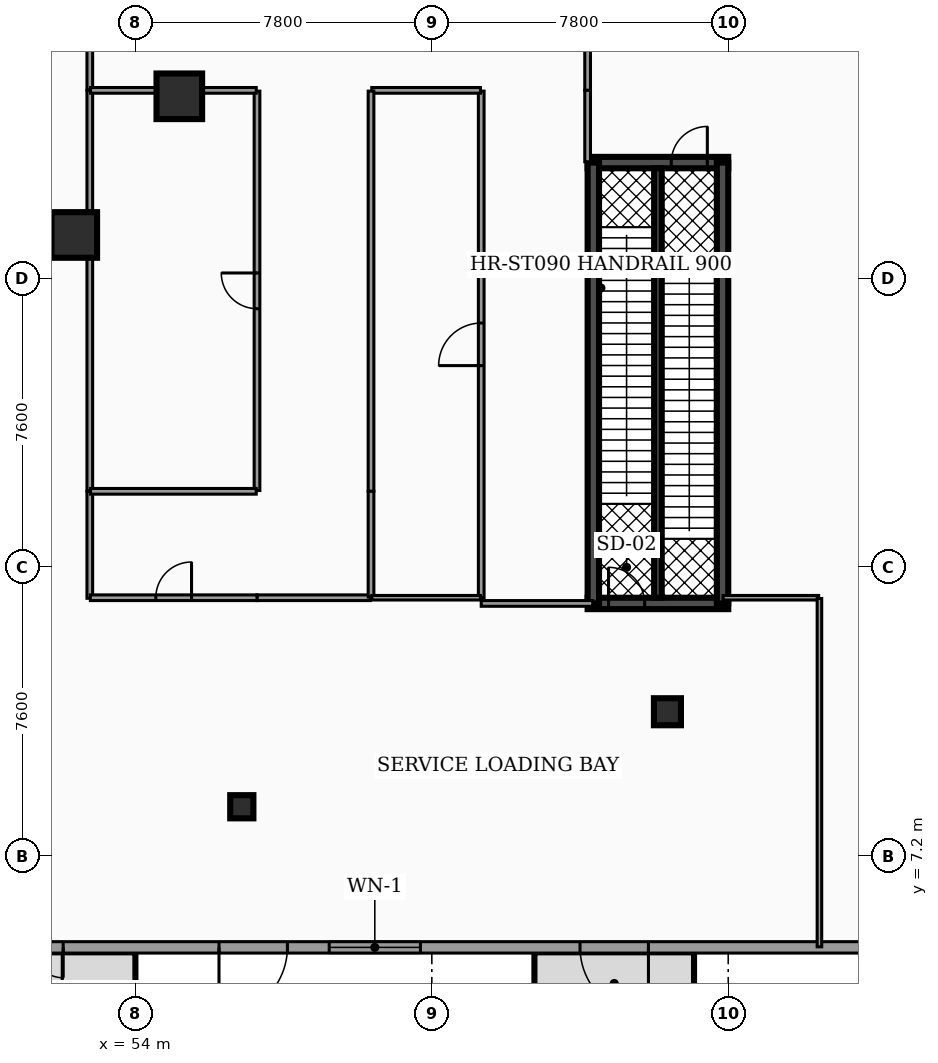
"""IFC4 building model, lengths in metres.
Left out: names, types, materials, properties, quantities, classifications, styles, units other than length and angle.
Written with IfcOpenShell. Run it as: python <this file> out.ifc"""

import sys

from ifc_helpers import new_model, si_unit, direction, frame, frame_2d, origin, origin_2d, place, context, subcontext, project, spatial, rectangle, hollow_rectangle, hollow_circle, extrude, element, fill, save


model = new_model("IFC4")
c1 = context("Model", 3, precision=1e-05, world=origin(), true_north=direction((0.0, 1.0)))
c2 = subcontext(c1, "Body", "Model", "MODEL_VIEW")
j1 = project(units=[si_unit("LENGTHUNIT", "METRE"), si_unit("PLANEANGLEUNIT", "RADIAN")], contexts=[c1])
p1 = place(None, origin())
s1 = spatial("IfcSite", under=j1, at=p1, CompositionType="ELEMENT")
p2 = place(p1, origin())
s2 = spatial("IfcBuilding", under=s1, at=p2, CompositionType="ELEMENT")
p3 = place(p2, origin())
s3 = spatial("IfcBuildingStorey", under=s2, at=p3, CompositionType="ELEMENT", Elevation=0.0)
p4 = place(p3, frame((65.9, 25.45, 0.0), z_axis=(0.0, 0.0, 1.0), x_axis=(1.0, 0.0, 0.0)))
e1 = element("IfcWall", 1, at=p4, inside=s3, PredefinedType="SHEAR", context=c2, shape_type="SweptSolid", body=[
    extrude(rectangle(XDim=3.7, YDim=0.3, at=frame_2d((1.85, 0.0))), origin(), (0.0, 0.0, 1.0), 4.82),
])
p5 = place(p4, frame((2.2, 0.0, 0.0)))
e2 = element("IfcOpeningElement", 2, at=p5, cuts=e1, PredefinedType="OPENING", context=c2, shape_type="SweptSolid", body=[
    extrude(rectangle(XDim=0.95, YDim=2.2, at=frame_2d((0.475, 1.1))), frame((0.0, 0.16, 0.0), z_axis=(0.0, -1.0, 0.0), x_axis=(1.0, 0.0, 0.0)), (0.0, 0.0, 1.0), 0.32),
])
p6 = place(p3, frame((65.9, 13.85, 0.0), z_axis=(0.0, 0.0, 1.0), x_axis=(1.0, 0.0, 0.0)))
e3 = element("IfcWall", 3, at=p6, inside=s3, PredefinedType="SHEAR", context=c2, shape_type="SweptSolid", body=[
    extrude(rectangle(XDim=3.7, YDim=0.3, at=frame_2d((1.85, 0.0))), origin(), (0.0, 0.0, 1.0), 4.82),
])
p7 = place(p6, frame((0.55, 0.0, 0.0)))
e4 = element("IfcOpeningElement", 4, at=p7, cuts=e3, PredefinedType="OPENING", context=c2, shape_type="SweptSolid", body=[
    extrude(rectangle(XDim=0.95, YDim=2.2, at=frame_2d((0.475, 1.1))), frame((0.0, 0.16, 0.0), z_axis=(0.0, -1.0, 0.0), x_axis=(1.0, 0.0, 0.0)), (0.0, 0.0, 1.0), 0.32),
])
for number, where, z_axis, x_axis in (
    (5, (66.05, 13.85, 0.0), (0.0, 0.0, 1.0), (0.0, 1.0, 0.0)),
    (6, (69.45, 13.85, 0.0), (0.0, 0.0, 1.0), (0.0, 1.0, 0.0)),
):
    element("IfcWall", number, at=place(p3, frame(where, z_axis=z_axis, x_axis=x_axis)), inside=s3, PredefinedType="SHEAR", context=c2, shape_type="SweptSolid", body=[
        extrude(rectangle(XDim=11.6, YDim=0.3, at=frame_2d((5.8, 0.0))), origin(), (0.0, 0.0, 1.0), 4.82),
    ])
p8 = place(p3, frame((67.75, 14.0, 0.0), z_axis=(0.0, 0.0, 1.0), x_axis=(0.0, 1.0, 0.0)))
e7 = element("IfcWall", 7, at=p8, inside=s3, PredefinedType="SHEAR", context=c2, shape_type="SweptSolid", body=[
    extrude(rectangle(XDim=11.3, YDim=0.2, at=frame_2d((5.65, 0.0))), origin(), (0.0, 0.0, 1.0), 4.82),
])
for number, where, z_axis, x_axis in (
    (8, (52.391, 23.545, 0.0), (0.0, 0.0, 1.0), (1.0, 0.0, 0.0)),
    (9, (55.156, 27.194, 0.0), (0.0, 0.0, 1.0), (1.0, 0.0, 0.0)),
):
    element("IfcColumn", number, at=place(p3, frame(where, z_axis=z_axis, x_axis=x_axis)), inside=s3, PredefinedType="COLUMN", context=c2, shape_type="SweptSolid", body=[
        extrude(hollow_rectangle(XDim=1.2, YDim=1.2, WallThickness=0.06, at=origin_2d()), origin(), (0.0, 0.0, 1.0), 4.82),
    ])
p9 = place(p3, frame((56.8, 8.5, 0.0), z_axis=(0.0, 0.0, 1.0), x_axis=(1.0, 0.0, 0.0)))
e10 = element("IfcColumn", 10, at=p9, inside=s3, PredefinedType="COLUMN", context=c2, shape_type="SweptSolid", body=[
    extrude(hollow_circle(Radius=0.305, WallThickness=0.025, at=origin_2d()), origin(), (0.0, 0.0, 1.0), 4.82),
])
p10 = place(p3, frame((68.0, 11.0, 0.0), z_axis=(0.0, 0.0, 1.0), x_axis=(1.0, 0.0, 0.0)))
e11 = element("IfcColumn", 11, at=p10, inside=s3, PredefinedType="COLUMN", context=c2, shape_type="SweptSolid", body=[
    extrude(hollow_circle(Radius=0.355, WallThickness=0.03, at=origin_2d()), origin(), (0.0, 0.0, 1.0), 4.82),
])
p11 = place(p3, frame((75.1, 4.8, 0.0), z_axis=(0.0, 0.0, 1.0), x_axis=(-1.0, 0.0, 0.0)))
e12 = element("IfcWall", 12, at=p11, inside=s3, PredefinedType="STANDARD", context=c2, shape_type="SweptSolid", body=[
    extrude(rectangle(XDim=73.4, YDim=0.3, at=frame_2d((36.7, 0.0))), origin(), (0.0, 0.0, 1.0), 4.205),
])
p12 = place(p11, frame((65.3, 0.0, 0.0)))
e13 = element("IfcOpeningElement", 13, at=p12, cuts=e12, PredefinedType="OPENING", context=c2, shape_type="SweptSolid", body=[
    extrude(rectangle(XDim=4.4, YDim=3.5, at=frame_2d((2.2, 1.75))), frame((0.0, 0.16, 0.0), z_axis=(0.0, -1.0, 0.0), x_axis=(1.0, 0.0, 0.0)), (0.0, 0.0, 1.0), 0.32),
])
p13 = place(p11, frame((31.15, 0.0, 0.0)))
e14 = element("IfcOpeningElement", 14, at=p13, cuts=e12, PredefinedType="OPENING", context=c2, shape_type="SweptSolid", body=[
    extrude(rectangle(XDim=2.4, YDim=2.6, at=frame_2d((1.2, 1.3))), frame((0.0, 0.16, 0.0), z_axis=(0.0, -1.0, 0.0), x_axis=(1.0, 0.0, 0.0)), (0.0, 0.0, 1.0), 0.32),
])
p14 = place(p11, frame((50.6, 0.0, 0.0)))
e15 = element("IfcOpeningElement", 15, at=p14, cuts=e12, PredefinedType="OPENING", context=c2, shape_type="SweptSolid", body=[
    extrude(rectangle(XDim=1.6, YDim=2.4, at=frame_2d((0.8, 1.2))), frame((0.0, 0.16, 0.0), z_axis=(0.0, -1.0, 0.0), x_axis=(1.0, 0.0, 0.0)), (0.0, 0.0, 1.0), 0.32),
])
p15 = place(p11, frame((23.0, 0.0, 0.0)))
e16 = element("IfcOpeningElement", 16, at=p15, cuts=e12, PredefinedType="OPENING", context=c2, shape_type="SweptSolid", body=[
    extrude(rectangle(XDim=1.6, YDim=2.4, at=frame_2d((0.8, 1.2))), frame((0.0, 0.16, 0.0), z_axis=(0.0, -1.0, 0.0), x_axis=(1.0, 0.0, 0.0)), (0.0, 0.0, 1.0), 0.32),
])
p16 = place(p11, frame((7.6, 0.0, 0.0)))
e17 = element("IfcOpeningElement", 17, at=p16, cuts=e12, PredefinedType="OPENING", context=c2, shape_type="SweptSolid", body=[
    extrude(rectangle(XDim=1.8, YDim=2.4, at=frame_2d((0.9, 1.2))), frame((0.0, 0.16, 0.0), z_axis=(0.0, -1.0, 0.0), x_axis=(1.0, 0.0, 0.0)), (0.0, 0.0, 1.0), 0.32),
])
p17 = place(p11, frame((17.1, 0.0, 0.0)))
e18 = element("IfcOpeningElement", 18, at=p17, cuts=e12, PredefinedType="OPENING", context=c2, shape_type="SweptSolid", body=[
    extrude(rectangle(XDim=1.8, YDim=2.4, at=frame_2d((0.9, 1.2))), frame((0.0, 0.16, 0.0), z_axis=(0.0, -1.0, 0.0), x_axis=(1.0, 0.0, 0.0)), (0.0, 0.0, 1.0), 0.32),
])
p18 = place(p11, frame((59.75, 0.0, 0.0)))
e19 = element("IfcOpeningElement", 19, at=p18, cuts=e12, PredefinedType="OPENING", context=c2, shape_type="SweptSolid", body=[
    extrude(rectangle(XDim=1.8, YDim=2.4, at=frame_2d((0.9, 1.2))), frame((0.0, 0.16, 0.0), z_axis=(0.0, -1.0, 0.0), x_axis=(1.0, 0.0, 0.0)), (0.0, 0.0, 1.0), 0.32),
])
p19 = place(p11, frame((13.6, 0.0, 0.9)))
e20 = element("IfcOpeningElement", 20, at=p19, cuts=e12, PredefinedType="OPENING", context=c2, shape_type="SweptSolid", body=[
    extrude(rectangle(XDim=2.4, YDim=2.5, at=frame_2d((1.2, 1.25))), frame((0.0, 0.16, 0.0), z_axis=(0.0, -1.0, 0.0), x_axis=(1.0, 0.0, 0.0)), (0.0, 0.0, 1.0), 0.32),
])
p20 = place(p11, frame((28.15, 0.0, 0.9)))
e21 = element("IfcOpeningElement", 21, at=p20, cuts=e12, PredefinedType="OPENING", context=c2, shape_type="SweptSolid", body=[
    extrude(rectangle(XDim=2.4, YDim=2.5, at=frame_2d((1.2, 1.25))), frame((0.0, 0.16, 0.0), z_axis=(0.0, -1.0, 0.0), x_axis=(1.0, 0.0, 0.0)), (0.0, 0.0, 1.0), 0.32),
])
p21 = place(p11, frame((44.1, 0.0, 0.9)))
e22 = element("IfcOpeningElement", 22, at=p21, cuts=e12, PredefinedType="OPENING", context=c2, shape_type="SweptSolid", body=[
    extrude(rectangle(XDim=2.4, YDim=2.5, at=frame_2d((1.2, 1.25))), frame((0.0, 0.16, 0.0), z_axis=(0.0, -1.0, 0.0), x_axis=(1.0, 0.0, 0.0)), (0.0, 0.0, 1.0), 0.32),
])
p22 = place(p3, frame((52.8, 27.355, 0.0), z_axis=(0.0, 0.0, 1.0), x_axis=(0.0, 1.0, 0.0)))
e23 = element("IfcWall", 23, at=p22, inside=s3, PredefinedType="PARTITIONING", context=c2, shape_type="SweptSolid", body=[
    extrude(rectangle(XDim=2.775, YDim=0.15, at=frame_2d((1.387, 0.0))), origin(), (0.0, 0.0, 1.0), 3.777),
])
p23 = place(p3, frame((52.8, 13.985, 0.0), z_axis=(0.0, 0.0, 1.0), x_axis=(0.0, 1.0, 0.0)))
e24 = element("IfcWall", 24, at=p23, inside=s3, PredefinedType="PARTITIONING", context=c2, shape_type="SweptSolid", body=[
    extrude(rectangle(XDim=2.81, YDim=0.15, at=frame_2d((1.405, 0.0))), origin(), (0.0, 0.0, 1.0), 3.777),
])
p24 = place(p3, frame((52.8, 16.805, 0.0), z_axis=(0.0, 0.0, 1.0), x_axis=(0.0, 1.0, 0.0)))
e25 = element("IfcWall", 25, at=p24, inside=s3, PredefinedType="PARTITIONING", context=c2, shape_type="SweptSolid", body=[
    extrude(rectangle(XDim=10.54, YDim=0.15, at=frame_2d((5.27, 0.0))), origin(), (0.0, 0.0, 1.0), 3.777),
])
p25 = place(p3, frame((63.1, 13.85, 0.0), z_axis=(0.0, 0.0, 1.0), x_axis=(1.0, 0.0, 0.0)))
e26 = element("IfcWall", 26, at=p25, inside=s3, PredefinedType="PARTITIONING", context=c2, shape_type="SweptSolid", body=[
    extrude(rectangle(XDim=2.935, YDim=0.15, at=frame_2d((1.467, 0.0))), origin(), (0.0, 0.0, 1.0), 3.777),
])
p26 = place(p3, frame((57.2, 14.0, 0.0), z_axis=(0.0, 0.0, 1.0), x_axis=(1.0, 0.0, 0.0)))
e27 = element("IfcWall", 27, at=p26, inside=s3, PredefinedType="PARTITIONING", context=c2, shape_type="SweptSolid", body=[
    extrude(rectangle(XDim=2.98, YDim=0.15, at=frame_2d((1.49, 0.0))), origin(), (0.0, 0.0, 1.0), 3.777),
])
p27 = place(p3, frame((52.815, 14.0, 0.0), z_axis=(0.0, 0.0, 1.0), x_axis=(1.0, 0.0, 0.0)))
e28 = element("IfcWall", 28, at=p27, inside=s3, PredefinedType="PARTITIONING", context=c2, shape_type="SweptSolid", body=[
    extrude(rectangle(XDim=4.385, YDim=0.15, at=frame_2d((2.192, 0.0))), origin(), (0.0, 0.0, 1.0), 3.777),
])
p28 = place(p27, frame((1.722, 0.0, 0.0)))
e29 = element("IfcOpeningElement", 29, at=p28, cuts=e28, PredefinedType="OPENING", context=c2, shape_type="SweptSolid", body=[
    extrude(rectangle(XDim=0.94, YDim=2.05, at=frame_2d((0.47, 1.025))), frame((0.0, 0.085, 0.0), z_axis=(0.0, -1.0, 0.0), x_axis=(1.0, 0.0, 0.0)), (0.0, 0.0, 1.0), 0.17),
])
p29 = place(p3, frame((63.1, 14.005, 0.0), z_axis=(0.0, 0.0, 1.0), x_axis=(0.0, 1.0, 0.0)))
e30 = element("IfcWall", 30, at=p29, inside=s3, PredefinedType="PARTITIONING", context=c2, shape_type="SweptSolid", body=[
    extrude(rectangle(XDim=13.325, YDim=0.15, at=frame_2d((6.663, 0.0))), origin(), (0.0, 0.0, 1.0), 3.777),
])
p30 = place(p29, frame((6.103, 0.0, 0.0)))
e31 = element("IfcOpeningElement", 31, at=p30, cuts=e30, PredefinedType="OPENING", context=c2, shape_type="SweptSolid", body=[
    extrude(rectangle(XDim=1.12, YDim=2.05, at=frame_2d((0.56, 1.025))), frame((0.0, 0.085, 0.0), z_axis=(0.0, -1.0, 0.0), x_axis=(1.0, 0.0, 0.0)), (0.0, 0.0, 1.0), 0.17),
])
p31 = place(p3, frame((60.22, 27.35, 0.0), z_axis=(0.0, 0.0, 1.0), x_axis=(1.0, 0.0, 0.0)))
e32 = element("IfcWall", 32, at=p31, inside=s3, PredefinedType="PARTITIONING", context=c2, shape_type="SweptSolid", body=[
    extrude(rectangle(XDim=2.86, YDim=0.15, at=frame_2d((1.43, 0.0))), origin(), (0.0, 0.0, 1.0), 3.777),
])
p32 = place(p3, frame((60.2, 16.8, 0.0), z_axis=(0.0, 0.0, 1.0), x_axis=(0.0, 1.0, 0.0)))
e33 = element("IfcWall", 33, at=p32, inside=s3, PredefinedType="PARTITIONING", context=c2, shape_type="SweptSolid", body=[
    extrude(rectangle(XDim=10.53, YDim=0.15, at=frame_2d((5.265, 0.0))), origin(), (0.0, 0.0, 1.0), 3.777),
])
p33 = place(p3, frame((60.2, 14.02, 0.0), z_axis=(0.0, 0.0, 1.0), x_axis=(0.0, 1.0, 0.0)))
e34 = element("IfcWall", 34, at=p33, inside=s3, PredefinedType="PARTITIONING", context=c2, shape_type="SweptSolid", body=[
    extrude(rectangle(XDim=2.78, YDim=0.15, at=frame_2d((1.39, 0.0))), origin(), (0.0, 0.0, 1.0), 3.777),
])
p34 = place(p3, frame((65.9, 27.35, 0.0), z_axis=(0.0, 0.0, 1.0), x_axis=(0.0, 1.0, 0.0)))
e35 = element("IfcWall", 35, at=p34, inside=s3, PredefinedType="PARTITIONING", context=c2, shape_type="SweptSolid", body=[
    extrude(rectangle(XDim=2.78, YDim=0.15, at=frame_2d((1.39, 0.0))), origin(), (0.0, 0.0, 1.0), 3.777),
])
p35 = place(p3, frame((65.9, 25.47, 0.0), z_axis=(0.0, 0.0, 1.0), x_axis=(0.0, 1.0, 0.0)))
e36 = element("IfcWall", 36, at=p35, inside=s3, PredefinedType="PARTITIONING", context=c2, shape_type="SweptSolid", body=[
    extrude(rectangle(XDim=1.88, YDim=0.15, at=frame_2d((0.94, 0.0))), origin(), (0.0, 0.0, 1.0), 3.777),
])
p36 = place(p3, frame((57.2, 16.82, 0.0), z_axis=(0.0, 0.0, 1.0), x_axis=(0.0, 1.0, 0.0)))
e37 = element("IfcWall", 37, at=p36, inside=s3, PredefinedType="PARTITIONING", context=c2, shape_type="SweptSolid", body=[
    extrude(rectangle(XDim=10.51, YDim=0.15, at=frame_2d((5.255, 0.0))), origin(), (0.0, 0.0, 1.0), 3.777),
])
p37 = place(p36, frame((4.785, 0.0, 0.0)))
e38 = element("IfcOpeningElement", 38, at=p37, cuts=e37, PredefinedType="OPENING", context=c2, shape_type="SweptSolid", body=[
    extrude(rectangle(XDim=0.94, YDim=2.05, at=frame_2d((0.47, 1.025))), frame((0.0, 0.085, 0.0), z_axis=(0.0, -1.0, 0.0), x_axis=(1.0, 0.0, 0.0)), (0.0, 0.0, 1.0), 0.17),
])
for number, where, z_axis, x_axis in (
    (39, (52.82, 27.35, 0.0), (0.0, 0.0, 1.0), (1.0, 0.0, 0.0)),
    (40, (52.82, 16.8, 0.0), (0.0, 0.0, 1.0), (1.0, 0.0, 0.0)),
):
    element("IfcWall", number, at=place(p3, frame(where, z_axis=z_axis, x_axis=x_axis)), inside=s3, PredefinedType="PARTITIONING", context=c2, shape_type="SweptSolid", body=[
        extrude(rectangle(XDim=4.36, YDim=0.15, at=frame_2d((2.18, 0.0))), origin(), (0.0, 0.0, 1.0), 3.777),
    ])
p38 = place(p3, frame((60.22, 14.0, 0.0), z_axis=(0.0, 0.0, 1.0), x_axis=(1.0, 0.0, 0.0)))
e41 = element("IfcWall", 41, at=p38, inside=s3, PredefinedType="PARTITIONING", context=c2, shape_type="SweptSolid", body=[
    extrude(rectangle(XDim=2.86, YDim=0.12, at=frame_2d((1.43, 0.0))), origin(), (0.0, 0.0, 1.0), 3.777),
])
p39 = place(p3, frame((69.465, 14.0, 0.0), z_axis=(0.0, 0.0, 1.0), x_axis=(1.0, 0.0, 0.0)))
e42 = element("IfcWall", 42, at=p39, inside=s3, PredefinedType="PARTITIONING", context=c2, shape_type="SweptSolid", body=[
    extrude(rectangle(XDim=2.515, YDim=0.12, at=frame_2d((1.257, 0.0))), origin(), (0.0, 0.0, 1.0), 3.777),
])
p40 = place(p3, frame((72.0, 4.815, 0.0), z_axis=(0.0, 0.0, 1.0), x_axis=(0.0, 1.0, 0.0)))
e43 = element("IfcWall", 43, at=p40, inside=s3, PredefinedType="PARTITIONING", context=c2, shape_type="SweptSolid", body=[
    extrude(rectangle(XDim=9.165, YDim=0.12, at=frame_2d((4.583, 0.0))), origin(), (0.0, 0.0, 1.0), 3.777),
])
p41 = place(p15, origin())
e44 = element("IfcDoor", 44, at=p41, inside=s3, OperationType="DOUBLE_DOOR_SINGLE_SWING", PredefinedType="DOOR", context=c2, shape_type="SweptSolid", body=[
    extrude(rectangle(XDim=1.6, YDim=2.4, at=frame_2d((0.8, 1.2))), frame((0.0, 0.025, 0.0), z_axis=(0.0, -1.0, 0.0), x_axis=(1.0, 0.0, 0.0)), (0.0, 0.0, 1.0), 0.05),
])
fill(e16, e44)
p42 = place(p16, origin())
e45 = element("IfcDoor", 45, at=p42, inside=s3, OperationType="SINGLE_SWING_LEFT", PredefinedType="DOOR", context=c2, shape_type="SweptSolid", body=[
    extrude(rectangle(XDim=1.8, YDim=2.4, at=frame_2d((0.9, 1.2))), frame((0.0, 0.025, 0.0), z_axis=(0.0, -1.0, 0.0), x_axis=(1.0, 0.0, 0.0)), (0.0, 0.0, 1.0), 0.05),
])
fill(e17, e45)
p43 = place(p17, origin())
e46 = element("IfcDoor", 46, at=p43, inside=s3, OperationType="SINGLE_SWING_RIGHT", PredefinedType="DOOR", context=c2, shape_type="SweptSolid", body=[
    extrude(rectangle(XDim=1.8, YDim=2.4, at=frame_2d((0.9, 1.2))), frame((0.0, 0.025, 0.0), z_axis=(0.0, -1.0, 0.0), x_axis=(1.0, 0.0, 0.0)), (0.0, 0.0, 1.0), 0.05),
])
fill(e18, e46)
p44 = place(p19, origin())
e47 = element("IfcWindow", 47, at=p44, inside=s3, PartitioningType="SINGLE_PANEL", PredefinedType="WINDOW", context=c2, shape_type="SweptSolid", body=[
    extrude(rectangle(XDim=2.4, YDim=2.5, at=frame_2d((1.2, 1.25))), frame((0.0, 0.03, 0.0), z_axis=(0.0, -1.0, 0.0), x_axis=(1.0, 0.0, 0.0)), (0.0, 0.0, 1.0), 0.06),
])
fill(e20, e47)
p45 = place(p7, origin())
e48 = element("IfcDoor", 48, at=p45, inside=s3, OperationType="SINGLE_SWING_LEFT", PredefinedType="DOOR", context=c2, shape_type="SweptSolid", body=[
    extrude(rectangle(XDim=0.95, YDim=2.2, at=frame_2d((0.475, 1.1))), frame((0.0, 0.025, 0.0), z_axis=(0.0, -1.0, 0.0), x_axis=(1.0, 0.0, 0.0)), (0.0, 0.0, 1.0), 0.05),
])
fill(e4, e48)
p46 = place(p5, origin())
e49 = element("IfcDoor", 49, at=p46, inside=s3, OperationType="SINGLE_SWING_RIGHT", PredefinedType="DOOR", context=c2, shape_type="SweptSolid", body=[
    extrude(rectangle(XDim=0.95, YDim=2.2, at=frame_2d((0.475, 1.1))), frame((0.0, 0.025, 0.0), z_axis=(0.0, -1.0, 0.0), x_axis=(1.0, 0.0, 0.0)), (0.0, 0.0, 1.0), 0.05),
])
fill(e2, e49)
p47 = place(p28, origin())
e50 = element("IfcDoor", 50, at=p47, inside=s3, OperationType="SINGLE_SWING_RIGHT", PredefinedType="DOOR", context=c2, shape_type="SweptSolid", body=[
    extrude(rectangle(XDim=0.94, YDim=2.05, at=frame_2d((0.47, 1.025))), frame((0.0, 0.025, 0.0), z_axis=(0.0, -1.0, 0.0), x_axis=(1.0, 0.0, 0.0)), (0.0, 0.0, 1.0), 0.05),
])
fill(e29, e50)
p48 = place(p30, origin())
e51 = element("IfcDoor", 51, at=p48, inside=s3, OperationType="SINGLE_SWING_LEFT", PredefinedType="DOOR", context=c2, shape_type="SweptSolid", body=[
    extrude(rectangle(XDim=1.12, YDim=2.05, at=frame_2d((0.56, 1.025))), frame((0.0, 0.025, 0.0), z_axis=(0.0, -1.0, 0.0), x_axis=(1.0, 0.0, 0.0)), (0.0, 0.0, 1.0), 0.05),
])
fill(e31, e51)
p49 = place(p37, origin())
e52 = element("IfcDoor", 52, at=p49, inside=s3, OperationType="SINGLE_SWING_RIGHT", PredefinedType="DOOR", context=c2, shape_type="SweptSolid", body=[
    extrude(rectangle(XDim=0.94, YDim=2.05, at=frame_2d((0.47, 1.025))), frame((0.0, 0.025, 0.0), z_axis=(0.0, -1.0, 0.0), x_axis=(1.0, 0.0, 0.0)), (0.0, 0.0, 1.0), 0.05),
])
fill(e38, e52)
save(model, sys.argv[1])
